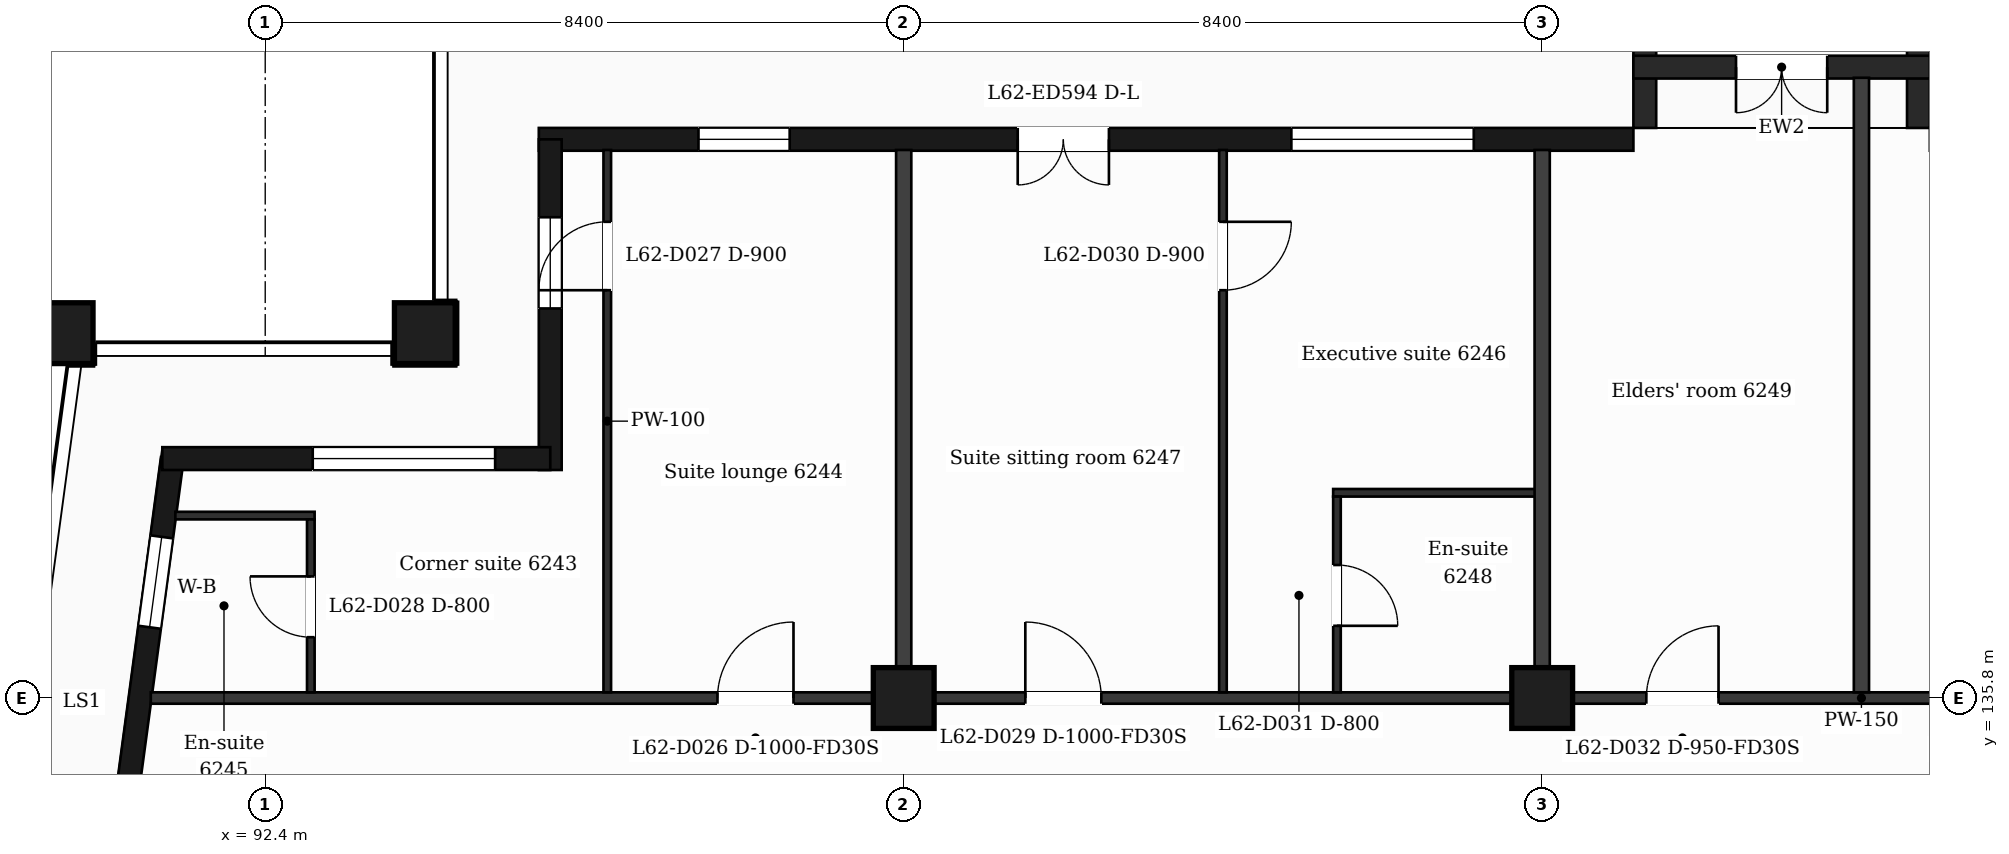
"""IFC4 building model, lengths in metres.
Left out: names, types, materials, properties, quantities, classifications, styles, units other than length and angle.
Written with IfcOpenShell. Run it as: python <this file> out.ifc"""

import sys

from ifc_helpers import new_model, si_unit, direction, frame, frame_2d, origin, origin_2d, place, context, subcontext, project, spatial, rectangle, extrude, element, fill, save


model = new_model("IFC4")
c1 = context("Model", 3, precision=1e-05, world=origin(), true_north=direction((0.0, 1.0)))
c2 = subcontext(c1, "Body", "Model", "MODEL_VIEW")
j1 = project(units=[si_unit("LENGTHUNIT", "METRE"), si_unit("PLANEANGLEUNIT", "RADIAN")], contexts=[c1])
p1 = place(None, origin())
s1 = spatial("IfcSite", under=j1, at=p1, CompositionType="ELEMENT")
p2 = place(p1, origin())
s2 = spatial("IfcBuilding", under=s1, at=p2, CompositionType="ELEMENT")
p3 = place(p2, frame((0.0, 0.0, 259.0)))
s3 = spatial("IfcBuildingStorey", under=s2, at=p3, CompositionType="ELEMENT", Elevation=259.0)
for number, where, z_axis, x_axis in (
    (1, (94.5, 140.6, 0.0), (0.0, 0.0, 1.0), (1.0, 0.0, 0.0)),
    (2, (89.735, 140.6, 0.0), (0.0, 0.0, 1.0), (1.0, 0.0, 0.0)),
    (3, (100.8, 135.8, 0.0), (0.0, 0.0, 1.0), (1.0, 0.0, 0.0)),
    (4, (109.2, 135.8, 0.0), (0.0, 0.0, 1.0), (1.0, 0.0, 0.0)),
):
    element("IfcColumn", number, at=place(p3, frame(where, z_axis=z_axis, x_axis=x_axis)), inside=s3, PredefinedType="COLUMN", context=c2, shape_type="SweptSolid", body=[
        extrude(rectangle(XDim=0.8, YDim=0.8, at=origin_2d()), origin(), (0.0, 0.0, 1.0), 3.7),
    ])
p4 = place(p3, frame((91.177, 138.95, 0.0), z_axis=(0.0, 0.0, 1.0), x_axis=(-0.133426664613, -0.991058689065, 0.0)))
e5 = element("IfcWall", 5, at=p4, inside=s3, PredefinedType="SOLIDWALL", context=c2, shape_type="SweptSolid", body=[
    extrude(rectangle(XDim=6.609, YDim=0.3, at=frame_2d((3.305, 0.0))), origin(), (0.0, 0.0, 1.0), 3.38),
])
p5 = place(p4, frame((1.039, 0.0, 0.9)))
e6 = element("IfcOpeningElement", 6, at=p5, cuts=e5, PredefinedType="OPENING", context=c2, shape_type="SweptSolid", body=[
    extrude(rectangle(XDim=1.2, YDim=2.1, at=frame_2d((0.6, 1.05))), frame((0.0, 0.16, 0.0), z_axis=(0.0, -1.0, 0.0), x_axis=(1.0, 0.0, 0.0)), (0.0, 0.0, 1.0), 0.32),
])
p6 = place(p4, frame((4.294, 0.0, 0.0)))
e7 = element("IfcOpeningElement", 7, at=p6, cuts=e5, PredefinedType="OPENING", context=c2, shape_type="SweptSolid", body=[
    extrude(rectangle(XDim=1.2, YDim=2.4, at=frame_2d((0.6, 1.2))), frame((0.0, 0.16, 0.0), z_axis=(0.0, -1.0, 0.0), x_axis=(1.0, 0.0, 0.0)), (0.0, 0.0, 1.0), 0.32),
])
p7 = place(p3, frame((110.4, 143.15, 0.0), z_axis=(0.0, 0.0, 1.0), x_axis=(-1.0, 0.0, 0.0)))
e8 = element("IfcWall", 8, at=p7, inside=s3, PredefinedType="SOLIDWALL", context=c2, shape_type="SweptSolid", body=[
    extrude(rectangle(XDim=14.4, YDim=0.3, at=frame_2d((7.2, 0.0))), origin(), (0.0, 0.0, 1.0), 3.38),
])
p8 = place(p7, frame((2.1, 0.0, 0.9)))
e9 = element("IfcOpeningElement", 9, at=p8, cuts=e8, PredefinedType="OPENING", context=c2, shape_type="SweptSolid", body=[
    extrude(rectangle(XDim=2.4, YDim=2.1, at=frame_2d((1.2, 1.05))), frame((0.0, 0.16, 0.0), z_axis=(0.0, -1.0, 0.0), x_axis=(1.0, 0.0, 0.0)), (0.0, 0.0, 1.0), 0.32),
])
p9 = place(p7, frame((6.9, 0.0, 0.0)))
e10 = element("IfcOpeningElement", 10, at=p9, cuts=e8, PredefinedType="OPENING", context=c2, shape_type="SweptSolid", body=[
    extrude(rectangle(XDim=1.2, YDim=2.4, at=frame_2d((0.6, 1.2))), frame((0.0, 0.16, 0.0), z_axis=(0.0, -1.0, 0.0), x_axis=(1.0, 0.0, 0.0)), (0.0, 0.0, 1.0), 0.32),
])
p10 = place(p7, frame((11.1, 0.0, 0.9)))
e11 = element("IfcOpeningElement", 11, at=p10, cuts=e8, PredefinedType="OPENING", context=c2, shape_type="SweptSolid", body=[
    extrude(rectangle(XDim=1.2, YDim=2.1, at=frame_2d((0.6, 1.05))), frame((0.0, 0.16, 0.0), z_axis=(0.0, -1.0, 0.0), x_axis=(1.0, 0.0, 0.0)), (0.0, 0.0, 1.0), 0.32),
])
for number, where, z_axis, x_axis in (
    (12, (114.15, 143.3, 0.0), (0.0, 0.0, 1.0), (0.0, 1.0, 0.0)),
    (13, (110.55, 143.3, 0.0), (0.0, 0.0, 1.0), (0.0, 1.0, 0.0)),
):
    element("IfcWall", number, at=place(p3, frame(where, z_axis=z_axis, x_axis=x_axis)), inside=s3, PredefinedType="SOLIDWALL", context=c2, shape_type="SweptSolid", body=[
        extrude(rectangle(XDim=1.35, YDim=0.3, at=frame_2d((0.675, 0.0))), origin(), (0.0, 0.0, 1.0), 3.38),
    ])
p11 = place(p3, frame((114.3, 144.1, 0.0), z_axis=(0.0, 0.0, 1.0), x_axis=(-1.0, 0.0, 0.0)))
e14 = element("IfcWall", 14, at=p11, inside=s3, PredefinedType="SOLIDWALL", context=c2, shape_type="SweptSolid", body=[
    extrude(rectangle(XDim=3.9, YDim=0.3, at=frame_2d((1.95, 0.0))), origin(), (0.0, 0.0, 1.0), 3.38),
])
p12 = place(p11, frame((1.35, 0.0, 0.0)))
e15 = element("IfcOpeningElement", 15, at=p12, cuts=e14, PredefinedType="OPENING", context=c2, shape_type="SweptSolid", body=[
    extrude(rectangle(XDim=1.2, YDim=2.4, at=frame_2d((0.6, 1.2))), frame((0.0, 0.16, 0.0), z_axis=(0.0, -1.0, 0.0), x_axis=(1.0, 0.0, 0.0)), (0.0, 0.0, 1.0), 0.32),
])
p13 = place(p3, frame((96.15, 143.15, 0.0), z_axis=(0.0, 0.0, 1.0), x_axis=(0.0, -1.0, 0.0)))
e16 = element("IfcWall", 16, at=p13, inside=s3, PredefinedType="SOLIDWALL", context=c2, shape_type="SweptSolid", body=[
    extrude(rectangle(XDim=4.35, YDim=0.3, at=frame_2d((2.175, 0.0))), origin(), (0.0, 0.0, 1.0), 3.38),
])
p14 = place(p13, frame((1.025, 0.0, 0.9)))
e17 = element("IfcOpeningElement", 17, at=p14, cuts=e16, PredefinedType="OPENING", context=c2, shape_type="SweptSolid", body=[
    extrude(rectangle(XDim=1.2, YDim=2.1, at=frame_2d((0.6, 1.05))), frame((0.0, 0.16, 0.0), z_axis=(0.0, -1.0, 0.0), x_axis=(1.0, 0.0, 0.0)), (0.0, 0.0, 1.0), 0.32),
])
p15 = place(p3, frame((96.15, 138.95, 0.0), z_axis=(0.0, 0.0, 1.0), x_axis=(-1.0, 0.0, 0.0)))
e18 = element("IfcWall", 18, at=p15, inside=s3, PredefinedType="SOLIDWALL", context=c2, shape_type="SweptSolid", body=[
    extrude(rectangle(XDim=5.104, YDim=0.3, at=frame_2d((2.552, 0.0))), origin(), (0.0, 0.0, 1.0), 3.38),
])
p16 = place(p15, frame((0.725, 0.0, 0.9)))
e19 = element("IfcOpeningElement", 19, at=p16, cuts=e18, PredefinedType="OPENING", context=c2, shape_type="SweptSolid", body=[
    extrude(rectangle(XDim=2.4, YDim=2.1, at=frame_2d((1.2, 1.05))), frame((0.0, 0.16, 0.0), z_axis=(0.0, -1.0, 0.0), x_axis=(1.0, 0.0, 0.0)), (0.0, 0.0, 1.0), 0.32),
])
p17 = place(p3, frame((90.895, 135.8, 0.0), z_axis=(0.0, 0.0, 1.0), x_axis=(1.0, 0.0, 0.0)))
e20 = element("IfcWall", 20, at=p17, inside=s3, PredefinedType="PARTITIONING", context=c2, shape_type="SweptSolid", body=[
    extrude(rectangle(XDim=45.011, YDim=0.15, at=frame_2d((22.505, 0.0))), origin(), (0.0, 0.0, 1.0), 3.38),
])
p18 = place(p17, frame((7.455, 0.0, 0.0)))
e21 = element("IfcOpeningElement", 21, at=p18, cuts=e20, PredefinedType="OPENING", context=c2, shape_type="SweptSolid", body=[
    extrude(rectangle(XDim=1.0, YDim=2.1, at=frame_2d((0.5, 1.05))), frame((0.0, 0.085, 0.0), z_axis=(0.0, -1.0, 0.0), x_axis=(1.0, 0.0, 0.0)), (0.0, 0.0, 1.0), 0.17),
])
p19 = place(p17, frame((11.505, 0.0, 0.0)))
e22 = element("IfcOpeningElement", 22, at=p19, cuts=e20, PredefinedType="OPENING", context=c2, shape_type="SweptSolid", body=[
    extrude(rectangle(XDim=1.0, YDim=2.1, at=frame_2d((0.5, 1.05))), frame((0.0, 0.085, 0.0), z_axis=(0.0, -1.0, 0.0), x_axis=(1.0, 0.0, 0.0)), (0.0, 0.0, 1.0), 0.17),
])
p20 = place(p17, frame((19.675, 0.0, 0.0)))
e23 = element("IfcOpeningElement", 23, at=p20, cuts=e20, PredefinedType="OPENING", context=c2, shape_type="SweptSolid", body=[
    extrude(rectangle(XDim=0.95, YDim=2.1, at=frame_2d((0.475, 1.05))), frame((0.0, 0.085, 0.0), z_axis=(0.0, -1.0, 0.0), x_axis=(1.0, 0.0, 0.0)), (0.0, 0.0, 1.0), 0.17),
])
p21 = place(p17, frame((24.531, 0.0, 0.0)))
e24 = element("IfcOpeningElement", 24, at=p21, cuts=e20, PredefinedType="OPENING", context=c2, shape_type="SweptSolid", body=[
    extrude(rectangle(XDim=1.0, YDim=2.1, at=frame_2d((0.5, 1.05))), frame((0.0, 0.085, 0.0), z_axis=(0.0, -1.0, 0.0), x_axis=(1.0, 0.0, 0.0)), (0.0, 0.0, 1.0), 0.17),
])
p22 = place(p17, frame((39.814, 0.0, 0.0)))
e25 = element("IfcOpeningElement", 25, at=p22, cuts=e20, PredefinedType="OPENING", context=c2, shape_type="SweptSolid", body=[
    extrude(rectangle(XDim=0.95, YDim=2.1, at=frame_2d((0.475, 1.05))), frame((0.0, 0.085, 0.0), z_axis=(0.0, -1.0, 0.0), x_axis=(1.0, 0.0, 0.0)), (0.0, 0.0, 1.0), 0.17),
])
p23 = place(p3, frame((91.218, 138.2, 0.0), z_axis=(0.0, 0.0, 1.0), x_axis=(1.0, 0.0, 0.0)))
e26 = element("IfcWall", 26, at=p23, inside=s3, PredefinedType="PARTITIONING", context=c2, shape_type="SweptSolid", body=[
    extrude(rectangle(XDim=1.832, YDim=0.1, at=frame_2d((0.916, 0.0))), origin(), (0.0, 0.0, 1.0), 3.38),
])
p24 = place(p3, frame((106.45, 138.5, 0.0), z_axis=(0.0, 0.0, 1.0), x_axis=(1.0, 0.0, 0.0)))
e27 = element("IfcWall", 27, at=p24, inside=s3, PredefinedType="PARTITIONING", context=c2, shape_type="SweptSolid", body=[
    extrude(rectangle(XDim=2.75, YDim=0.1, at=frame_2d((1.375, 0.0))), origin(), (0.0, 0.0, 1.0), 3.38),
])
p25 = place(p3, frame((93.0, 135.875, 0.0), z_axis=(0.0, 0.0, 1.0), x_axis=(0.0, 1.0, 0.0)))
e28 = element("IfcWall", 28, at=p25, inside=s3, PredefinedType="PARTITIONING", context=c2, shape_type="SweptSolid", body=[
    extrude(rectangle(XDim=2.275, YDim=0.1, at=frame_2d((1.137, 0.0))), origin(), (0.0, 0.0, 1.0), 3.38),
])
p26 = place(p25, frame((0.725, 0.0, 0.0)))
e29 = element("IfcOpeningElement", 29, at=p26, cuts=e28, PredefinedType="OPENING", context=c2, shape_type="SweptSolid", body=[
    extrude(rectangle(XDim=0.8, YDim=2.1, at=frame_2d((0.4, 1.05))), frame((0.0, 0.06, 0.0), z_axis=(0.0, -1.0, 0.0), x_axis=(1.0, 0.0, 0.0)), (0.0, 0.0, 1.0), 0.12),
])
p27 = place(p3, frame((96.9, 135.875, 0.0), z_axis=(0.0, 0.0, 1.0), x_axis=(0.0, 1.0, 0.0)))
e30 = element("IfcWall", 30, at=p27, inside=s3, PredefinedType="PARTITIONING", context=c2, shape_type="SweptSolid", body=[
    extrude(rectangle(XDim=7.135, YDim=0.1, at=frame_2d((3.567, 0.0))), origin(), (0.0, 0.0, 1.0), 3.38),
])
p28 = place(p27, frame((5.29, 0.0, 0.0)))
e31 = element("IfcOpeningElement", 31, at=p28, cuts=e30, PredefinedType="OPENING", context=c2, shape_type="SweptSolid", body=[
    extrude(rectangle(XDim=0.9, YDim=2.1, at=frame_2d((0.45, 1.05))), frame((0.0, 0.06, 0.0), z_axis=(0.0, -1.0, 0.0), x_axis=(1.0, 0.0, 0.0)), (0.0, 0.0, 1.0), 0.12),
])
p29 = place(p3, frame((100.8, 135.875, 0.0), z_axis=(0.0, 0.0, 1.0), x_axis=(0.0, 1.0, 0.0)))
e32 = element("IfcWall", 32, at=p29, inside=s3, PredefinedType="PARTITIONING", context=c2, shape_type="SweptSolid", body=[
    extrude(rectangle(XDim=7.135, YDim=0.2, at=frame_2d((3.567, 0.0))), origin(), (0.0, 0.0, 1.0), 3.38),
])
p30 = place(p3, frame((105.0, 135.875, 0.0), z_axis=(0.0, 0.0, 1.0), x_axis=(0.0, 1.0, 0.0)))
e33 = element("IfcWall", 33, at=p30, inside=s3, PredefinedType="PARTITIONING", context=c2, shape_type="SweptSolid", body=[
    extrude(rectangle(XDim=7.135, YDim=0.1, at=frame_2d((3.567, 0.0))), origin(), (0.0, 0.0, 1.0), 3.38),
])
p31 = place(p30, frame((5.29, 0.0, 0.0)))
e34 = element("IfcOpeningElement", 34, at=p31, cuts=e33, PredefinedType="OPENING", context=c2, shape_type="SweptSolid", body=[
    extrude(rectangle(XDim=0.9, YDim=2.1, at=frame_2d((0.45, 1.05))), frame((0.0, 0.06, 0.0), z_axis=(0.0, -1.0, 0.0), x_axis=(1.0, 0.0, 0.0)), (0.0, 0.0, 1.0), 0.12),
])
p32 = place(p3, frame((106.5, 135.875, 0.0), z_axis=(0.0, 0.0, 1.0), x_axis=(0.0, 1.0, 0.0)))
e35 = element("IfcWall", 35, at=p32, inside=s3, PredefinedType="PARTITIONING", context=c2, shape_type="SweptSolid", body=[
    extrude(rectangle(XDim=2.575, YDim=0.1, at=frame_2d((1.288, 0.0))), origin(), (0.0, 0.0, 1.0), 3.38),
])
p33 = place(p32, frame((0.875, 0.0, 0.0)))
e36 = element("IfcOpeningElement", 36, at=p33, cuts=e35, PredefinedType="OPENING", context=c2, shape_type="SweptSolid", body=[
    extrude(rectangle(XDim=0.8, YDim=2.1, at=frame_2d((0.4, 1.05))), frame((0.0, 0.06, 0.0), z_axis=(0.0, -1.0, 0.0), x_axis=(1.0, 0.0, 0.0)), (0.0, 0.0, 1.0), 0.12),
])
p34 = place(p3, frame((109.2, 135.875, 0.0), z_axis=(0.0, 0.0, 1.0), x_axis=(0.0, 1.0, 0.0)))
e37 = element("IfcWall", 37, at=p34, inside=s3, PredefinedType="PARTITIONING", context=c2, shape_type="SweptSolid", body=[
    extrude(rectangle(XDim=7.135, YDim=0.2, at=frame_2d((3.567, 0.0))), origin(), (0.0, 0.0, 1.0), 3.38),
])
p35 = place(p3, frame((113.4, 135.875, 0.0), z_axis=(0.0, 0.0, 1.0), x_axis=(0.0, 1.0, 0.0)))
e38 = element("IfcWall", 38, at=p35, inside=s3, PredefinedType="PARTITIONING", context=c2, shape_type="SweptSolid", body=[
    extrude(rectangle(XDim=8.085, YDim=0.2, at=frame_2d((4.042, 0.0))), origin(), (0.0, 0.0, 1.0), 3.38),
])
p36 = place(p5, origin())
e39 = element("IfcWindow", 39, at=p36, inside=s3, PartitioningType="SINGLE_PANEL", PredefinedType="WINDOW", context=c2, shape_type="SweptSolid", body=[
    extrude(rectangle(XDim=1.2, YDim=2.1, at=frame_2d((0.6, 1.05))), frame((0.0, 0.03, 0.0), z_axis=(0.0, -1.0, 0.0), x_axis=(1.0, 0.0, 0.0)), (0.0, 0.0, 1.0), 0.06),
])
fill(e6, e39)
p37 = place(p8, origin())
e40 = element("IfcWindow", 40, at=p37, inside=s3, PartitioningType="SINGLE_PANEL", PredefinedType="WINDOW", context=c2, shape_type="SweptSolid", body=[
    extrude(rectangle(XDim=2.4, YDim=2.1, at=frame_2d((1.2, 1.05))), frame((0.0, 0.03, 0.0), z_axis=(0.0, -1.0, 0.0), x_axis=(1.0, 0.0, 0.0)), (0.0, 0.0, 1.0), 0.06),
])
fill(e9, e40)
p38 = place(p9, origin())
e41 = element("IfcDoor", 41, at=p38, inside=s3, OperationType="DOUBLE_DOOR_SINGLE_SWING", PredefinedType="DOOR", context=c2, shape_type="SweptSolid", body=[
    extrude(rectangle(XDim=1.2, YDim=2.4, at=frame_2d((0.6, 1.2))), frame((0.0, 0.025, 0.0), z_axis=(0.0, -1.0, 0.0), x_axis=(1.0, 0.0, 0.0)), (0.0, 0.0, 1.0), 0.05),
])
fill(e10, e41)
p39 = place(p10, origin())
e42 = element("IfcWindow", 42, at=p39, inside=s3, PartitioningType="SINGLE_PANEL", PredefinedType="WINDOW", context=c2, shape_type="SweptSolid", body=[
    extrude(rectangle(XDim=1.2, YDim=2.1, at=frame_2d((0.6, 1.05))), frame((0.0, 0.03, 0.0), z_axis=(0.0, -1.0, 0.0), x_axis=(1.0, 0.0, 0.0)), (0.0, 0.0, 1.0), 0.06),
])
fill(e11, e42)
p40 = place(p12, origin())
e43 = element("IfcDoor", 43, at=p40, inside=s3, OperationType="DOUBLE_DOOR_SINGLE_SWING", PredefinedType="DOOR", context=c2, shape_type="SweptSolid", body=[
    extrude(rectangle(XDim=1.2, YDim=2.4, at=frame_2d((0.6, 1.2))), frame((0.0, 0.025, 0.0), z_axis=(0.0, -1.0, 0.0), x_axis=(1.0, 0.0, 0.0)), (0.0, 0.0, 1.0), 0.05),
])
fill(e15, e43)
p41 = place(p14, origin())
e44 = element("IfcWindow", 44, at=p41, inside=s3, PartitioningType="SINGLE_PANEL", PredefinedType="WINDOW", context=c2, shape_type="SweptSolid", body=[
    extrude(rectangle(XDim=1.2, YDim=2.1, at=frame_2d((0.6, 1.05))), frame((0.0, 0.03, 0.0), z_axis=(0.0, -1.0, 0.0), x_axis=(1.0, 0.0, 0.0)), (0.0, 0.0, 1.0), 0.06),
])
fill(e17, e44)
p42 = place(p16, origin())
e45 = element("IfcWindow", 45, at=p42, inside=s3, PartitioningType="SINGLE_PANEL", PredefinedType="WINDOW", context=c2, shape_type="SweptSolid", body=[
    extrude(rectangle(XDim=2.4, YDim=2.1, at=frame_2d((1.2, 1.05))), frame((0.0, 0.03, 0.0), z_axis=(0.0, -1.0, 0.0), x_axis=(1.0, 0.0, 0.0)), (0.0, 0.0, 1.0), 0.06),
])
fill(e19, e45)
p43 = place(p18, origin())
e46 = element("IfcDoor", 46, at=p43, inside=s3, OperationType="SINGLE_SWING_RIGHT", PredefinedType="DOOR", context=c2, shape_type="SweptSolid", body=[
    extrude(rectangle(XDim=1.0, YDim=2.1, at=frame_2d((0.5, 1.05))), frame((0.0, 0.025, 0.0), z_axis=(0.0, -1.0, 0.0), x_axis=(1.0, 0.0, 0.0)), (0.0, 0.0, 1.0), 0.05),
])
fill(e21, e46)
p44 = place(p28, origin())
e47 = element("IfcDoor", 47, at=p44, inside=s3, OperationType="SINGLE_SWING_LEFT", PredefinedType="DOOR", context=c2, shape_type="SweptSolid", body=[
    extrude(rectangle(XDim=0.9, YDim=2.1, at=frame_2d((0.45, 1.05))), frame((0.0, 0.025, 0.0), z_axis=(0.0, -1.0, 0.0), x_axis=(1.0, 0.0, 0.0)), (0.0, 0.0, 1.0), 0.05),
])
fill(e31, e47)
p45 = place(p26, origin())
e48 = element("IfcDoor", 48, at=p45, inside=s3, OperationType="SINGLE_SWING_RIGHT", PredefinedType="DOOR", context=c2, shape_type="SweptSolid", body=[
    extrude(rectangle(XDim=0.8, YDim=2.1, at=frame_2d((0.4, 1.05))), frame((0.0, 0.025, 0.0), z_axis=(0.0, -1.0, 0.0), x_axis=(1.0, 0.0, 0.0)), (0.0, 0.0, 1.0), 0.05),
])
fill(e29, e48)
p46 = place(p19, origin())
e49 = element("IfcDoor", 49, at=p46, inside=s3, OperationType="SINGLE_SWING_LEFT", PredefinedType="DOOR", context=c2, shape_type="SweptSolid", body=[
    extrude(rectangle(XDim=1.0, YDim=2.1, at=frame_2d((0.5, 1.05))), frame((0.0, 0.025, 0.0), z_axis=(0.0, -1.0, 0.0), x_axis=(1.0, 0.0, 0.0)), (0.0, 0.0, 1.0), 0.05),
])
fill(e22, e49)
p47 = place(p31, origin())
e50 = element("IfcDoor", 50, at=p47, inside=s3, OperationType="SINGLE_SWING_RIGHT", PredefinedType="DOOR", context=c2, shape_type="SweptSolid", body=[
    extrude(rectangle(XDim=0.9, YDim=2.1, at=frame_2d((0.45, 1.05))), frame((0.0, 0.025, 0.0), z_axis=(0.0, -1.0, 0.0), x_axis=(1.0, 0.0, 0.0)), (0.0, 0.0, 1.0), 0.05),
])
fill(e34, e50)
p48 = place(p33, origin())
e51 = element("IfcDoor", 51, at=p48, inside=s3, OperationType="SINGLE_SWING_LEFT", PredefinedType="DOOR", context=c2, shape_type="SweptSolid", body=[
    extrude(rectangle(XDim=0.8, YDim=2.1, at=frame_2d((0.4, 1.05))), frame((0.0, 0.025, 0.0), z_axis=(0.0, -1.0, 0.0), x_axis=(1.0, 0.0, 0.0)), (0.0, 0.0, 1.0), 0.05),
])
fill(e36, e51)
p49 = place(p20, origin())
e52 = element("IfcDoor", 52, at=p49, inside=s3, OperationType="SINGLE_SWING_RIGHT", PredefinedType="DOOR", context=c2, shape_type="SweptSolid", body=[
    extrude(rectangle(XDim=0.95, YDim=2.1, at=frame_2d((0.475, 1.05))), frame((0.0, 0.025, 0.0), z_axis=(0.0, -1.0, 0.0), x_axis=(1.0, 0.0, 0.0)), (0.0, 0.0, 1.0), 0.05),
])
fill(e23, e52)
save(model, sys.argv[1])
